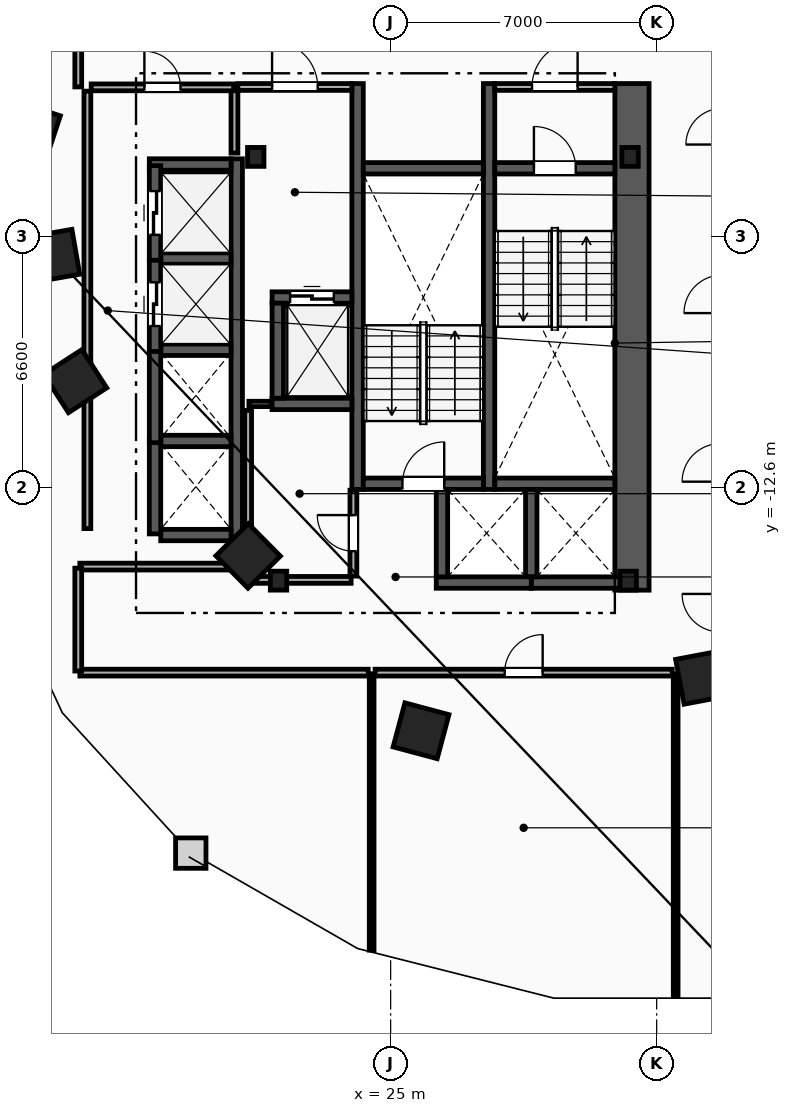
"""IFC4 building model, lengths in metres.
Left out: names, types, materials, properties, quantities, classifications, styles, units other than length and angle.
Written with IfcOpenShell. Run it as: python <this file> out.ifc"""

import sys

from ifc_helpers import new_model, si_unit, direction, frame, frame_2d, origin, origin_2d, place, context, subcontext, project, spatial, rectangle, i_section, extrude, element, fill, save


model = new_model("IFC4")
c1 = context("Model", 3, precision=1e-05, world=origin(), true_north=direction((0.0, 1.0)))
c2 = subcontext(c1, "Body", "Model", "MODEL_VIEW")
j1 = project(units=[si_unit("LENGTHUNIT", "METRE"), si_unit("PLANEANGLEUNIT", "RADIAN")], contexts=[c1])
p1 = place(None, origin())
s1 = spatial("IfcSite", under=j1, at=p1, CompositionType="ELEMENT")
p2 = place(p1, origin())
s2 = spatial("IfcBuilding", under=s1, at=p2, CompositionType="ELEMENT")
p3 = place(p2, frame((0.0, 0.0, 58.2)))
s3 = spatial("IfcBuildingStorey", under=s2, at=p3, CompositionType="ELEMENT", Elevation=58.2)
for number, where, z_axis, x_axis in (
    (1, (31.3, -3.9, 0.0), (0.0, 0.0, 1.0), (1.0, 0.0, 0.0)),
    (2, (21.45, -3.9, 0.0), (0.0, 0.0, 1.0), (1.0, 0.0, 0.0)),
    (3, (22.05, -15.05, 0.0), (0.0, 0.0, 1.0), (1.0, 0.0, 0.0)),
    (4, (31.25, -15.05, 0.0), (0.0, 0.0, 1.0), (1.0, 0.0, 0.0)),
):
    element("IfcColumn", number, at=place(p3, frame(where, z_axis=z_axis, x_axis=x_axis)), inside=s3, PredefinedType="COLUMN", context=c2, shape_type="SweptSolid", body=[
        extrude(i_section(OverallWidth=0.432, OverallDepth=0.498, WebThickness=0.056, FlangeThickness=0.089, FilletRadius=0.018, at=origin_2d()), origin(), (0.0, 0.0, 1.0), 3.8),
    ])
for number, where, z_axis, x_axis in (
    (5, (15.55, -3.2, 0.0), (0.0, 0.0, 1.0), (-0.315, -0.949, 0.0)),
    (6, (16.125, -6.5, 0.0), (0.0, 0.0, 1.0), (0.172, -0.985, 0.0)),
    (7, (16.7, -9.8, 0.0), (0.0, 0.0, 1.0), (0.544, -0.839, 0.0)),
    (8, (21.25, -14.4, 0.0), (0.0, 0.0, 1.0), (0.703, -0.711, 0.0)),
    (9, (25.8, -19.0, 0.0), (0.0, 0.0, 1.0), (0.966, -0.259, 0.0)),
    (10, (33.2, -17.6, 0.0), (0.0, 0.0, 1.0), (0.983, 0.186, 0.0)),
):
    element("IfcColumn", number, at=place(p3, frame(where, z_axis=z_axis, x_axis=x_axis)), inside=s3, PredefinedType="COLUMN", context=c2, shape_type="SweptSolid", body=[
        extrude(rectangle(XDim=1.2, YDim=1.2, at=origin_2d()), origin(), (0.0, 0.0, 1.0), 3.8),
    ])
p4 = place(p3, frame((31.35, -15.3, 0.0), z_axis=(0.0, 0.0, 1.0), x_axis=(0.0, 1.0, 0.0)))
e11 = element("IfcWall", 11, at=p4, inside=s3, PredefinedType="SHEAR", context=c2, shape_type="SweptSolid", body=[
    extrude(rectangle(XDim=13.33, YDim=0.9, at=frame_2d((6.665, 0.0))), origin(), (0.0, 0.0, 1.0), 3.5),
])
for number, where, z_axis, x_axis in (
    (12, (27.59, -12.65, 0.0), (0.0, 0.0, 1.0), (0.0, 1.0, 0.0)),
    (13, (24.13, -12.65, 0.0), (0.0, 0.0, 1.0), (0.0, 1.0, 0.0)),
):
    element("IfcWall", number, at=place(p3, frame(where, z_axis=z_axis, x_axis=x_axis)), inside=s3, PredefinedType="SHEAR", context=c2, shape_type="SweptSolid", body=[
        extrude(rectangle(XDim=10.68, YDim=0.3, at=frame_2d((5.34, 0.0))), origin(), (0.0, 0.0, 1.0), 3.5),
    ])
p5 = place(p3, frame((27.74, -4.2, 0.0), z_axis=(0.0, 0.0, 1.0), x_axis=(1.0, 0.0, 0.0)))
e14 = element("IfcWall", 14, at=p5, inside=s3, PredefinedType="SHEAR", context=c2, shape_type="SweptSolid", body=[
    extrude(rectangle(XDim=3.16, YDim=0.3, at=frame_2d((1.58, 0.0))), origin(), (0.0, 0.0, 1.0), 3.5),
])
p6 = place(p5, frame((1.03, 0.0, 0.0)))
e15 = element("IfcOpeningElement", 15, at=p6, cuts=e14, PredefinedType="OPENING", context=c2, shape_type="SweptSolid", body=[
    extrude(rectangle(XDim=1.1, YDim=2.15, at=frame_2d((0.55, 1.075))), frame((0.0, 0.16, 0.0), z_axis=(0.0, -1.0, 0.0), x_axis=(1.0, 0.0, 0.0)), (0.0, 0.0, 1.0), 0.32),
])
p7 = place(p3, frame((27.74, -12.5, 0.0), z_axis=(0.0, 0.0, 1.0), x_axis=(1.0, 0.0, 0.0)))
e16 = element("IfcWall", 16, at=p7, inside=s3, PredefinedType="SHEAR", context=c2, shape_type="SweptSolid", body=[
    extrude(rectangle(XDim=3.16, YDim=0.3, at=frame_2d((1.58, 0.0))), origin(), (0.0, 0.0, 1.0), 3.5),
])
p8 = place(p3, frame((24.28, -12.5, 0.0), z_axis=(0.0, 0.0, 1.0), x_axis=(1.0, 0.0, 0.0)))
e17 = element("IfcWall", 17, at=p8, inside=s3, PredefinedType="SHEAR", context=c2, shape_type="SweptSolid", body=[
    extrude(rectangle(XDim=3.16, YDim=0.3, at=frame_2d((1.58, 0.0))), origin(), (0.0, 0.0, 1.0), 3.5),
])
p9 = place(p8, frame((1.03, 0.0, 0.0)))
e18 = element("IfcOpeningElement", 18, at=p9, cuts=e17, PredefinedType="OPENING", context=c2, shape_type="SweptSolid", body=[
    extrude(rectangle(XDim=1.1, YDim=2.15, at=frame_2d((0.55, 1.075))), frame((0.0, 0.16, 0.0), z_axis=(0.0, -1.0, 0.0), x_axis=(1.0, 0.0, 0.0)), (0.0, 0.0, 1.0), 0.32),
])
p10 = place(p3, frame((24.28, -4.2, 0.0), z_axis=(0.0, 0.0, 1.0), x_axis=(1.0, 0.0, 0.0)))
e19 = element("IfcWall", 19, at=p10, inside=s3, PredefinedType="SHEAR", context=c2, shape_type="SweptSolid", body=[
    extrude(rectangle(XDim=3.16, YDim=0.3, at=frame_2d((1.58, 0.0))), origin(), (0.0, 0.0, 1.0), 3.5),
])
p11 = place(p3, frame((20.89, -3.8, 0.0), z_axis=(0.0, 0.0, 1.0), x_axis=(0.0, 1.0, 0.0)))
e20 = element("IfcWall", 20, at=p11, inside=s3, PredefinedType="PARTITIONING", context=c2, shape_type="SweptSolid", body=[
    extrude(rectangle(XDim=1.65, YDim=0.18, at=frame_2d((0.825, 0.0))), origin(), (0.0, 0.0, 1.0), 3.5),
])
p12 = place(p3, frame((20.98, -2.06, 0.0), z_axis=(0.0, 0.0, 1.0), x_axis=(1.0, 0.0, 0.0)))
e21 = element("IfcWall", 21, at=p12, inside=s3, PredefinedType="PARTITIONING", context=c2, shape_type="SweptSolid", body=[
    extrude(rectangle(XDim=3.0, YDim=0.18, at=frame_2d((1.5, 0.0))), origin(), (0.0, 0.0, 1.0), 3.5),
])
p13 = place(p12, frame((0.9, 0.0, 0.0)))
e22 = element("IfcOpeningElement", 22, at=p13, cuts=e21, PredefinedType="OPENING", context=c2, shape_type="SweptSolid", body=[
    extrude(rectangle(XDim=1.2, YDim=2.15, at=frame_2d((0.6, 1.075))), frame((0.0, 0.1, 0.0), z_axis=(0.0, -1.0, 0.0), x_axis=(1.0, 0.0, 0.0)), (0.0, 0.0, 1.0), 0.2),
])
p14 = place(p3, frame((27.74, -2.06, 0.0), z_axis=(0.0, 0.0, 1.0), x_axis=(1.0, 0.0, 0.0)))
e23 = element("IfcWall", 23, at=p14, inside=s3, PredefinedType="PARTITIONING", context=c2, shape_type="SweptSolid", body=[
    extrude(rectangle(XDim=3.16, YDim=0.18, at=frame_2d((1.58, 0.0))), origin(), (0.0, 0.0, 1.0), 3.5),
])
p15 = place(p14, frame((0.98, 0.0, 0.0)))
e24 = element("IfcOpeningElement", 24, at=p15, cuts=e23, PredefinedType="OPENING", context=c2, shape_type="SweptSolid", body=[
    extrude(rectangle(XDim=1.2, YDim=2.15, at=frame_2d((0.6, 1.075))), frame((0.0, 0.1, 0.0), z_axis=(0.0, -1.0, 0.0), x_axis=(1.0, 0.0, 0.0)), (0.0, 0.0, 1.0), 0.2),
])
p16 = place(p3, frame((21.88, -7.6, 0.0), z_axis=(0.0, 0.0, 1.0), x_axis=(1.0, 0.0, 0.0)))
e25 = element("IfcWall", 25, at=p16, inside=s3, PredefinedType="SHEAR", context=c2, shape_type="SweptSolid", body=[
    extrude(rectangle(XDim=2.1, YDim=0.3, at=frame_2d((1.05, 0.0))), origin(), (0.0, 0.0, 1.0), 3.5),
])
p17 = place(p16, frame((0.475, 0.0, 0.0)))
e26 = element("IfcOpeningElement", 26, at=p17, cuts=e25, PredefinedType="OPENING", context=c2, shape_type="SweptSolid", body=[
    extrude(rectangle(XDim=1.15, YDim=2.2, at=frame_2d((0.575, 1.1))), frame((0.0, 0.16, 0.0), z_axis=(0.0, -1.0, 0.0), x_axis=(1.0, 0.0, 0.0)), (0.0, 0.0, 1.0), 0.32),
])
p18 = place(p3, frame((21.88, -10.4, 0.0), z_axis=(0.0, 0.0, 1.0), x_axis=(1.0, 0.0, 0.0)))
e27 = element("IfcWall", 27, at=p18, inside=s3, PredefinedType="SHEAR", context=c2, shape_type="SweptSolid", body=[
    extrude(rectangle(XDim=2.1, YDim=0.3, at=frame_2d((1.05, 0.0))), origin(), (0.0, 0.0, 1.0), 3.5),
])
for number, where, z_axis, x_axis in (
    (28, (22.03, -10.25, 0.0), (0.0, 0.0, 1.0), (0.0, 1.0, 0.0)),
    (29, (28.7, -15.1, 0.0), (0.0, 0.0, 1.0), (1.0, 0.0, 0.0)),
):
    element("IfcWall", number, at=place(p3, frame(where, z_axis=z_axis, x_axis=x_axis)), inside=s3, PredefinedType="SHEAR", context=c2, shape_type="SweptSolid", body=[
        extrude(rectangle(XDim=2.5, YDim=0.3, at=frame_2d((1.25, 0.0))), origin(), (0.0, 0.0, 1.0), 3.5),
    ])
p19 = place(p3, frame((28.7, -14.95, 0.0), z_axis=(0.0, 0.0, 1.0), x_axis=(0.0, 1.0, 0.0)))
e30 = element("IfcWall", 30, at=p19, inside=s3, PredefinedType="SHEAR", context=c2, shape_type="SweptSolid", body=[
    extrude(rectangle(XDim=2.3, YDim=0.3, at=frame_2d((1.15, 0.0))), origin(), (0.0, 0.0, 1.0), 3.5),
])
p20 = place(p3, frame((26.2, -15.1, 0.0), z_axis=(0.0, 0.0, 1.0), x_axis=(1.0, 0.0, 0.0)))
e31 = element("IfcWall", 31, at=p20, inside=s3, PredefinedType="SHEAR", context=c2, shape_type="SweptSolid", body=[
    extrude(rectangle(XDim=2.5, YDim=0.3, at=frame_2d((1.25, 0.0))), origin(), (0.0, 0.0, 1.0), 3.5),
])
p21 = place(p3, frame((26.35, -14.95, 0.0), z_axis=(0.0, 0.0, 1.0), x_axis=(0.0, 1.0, 0.0)))
e32 = element("IfcWall", 32, at=p21, inside=s3, PredefinedType="SHEAR", context=c2, shape_type="SweptSolid", body=[
    extrude(rectangle(XDim=2.3, YDim=0.3, at=frame_2d((1.15, 0.0))), origin(), (0.0, 0.0, 1.0), 3.5),
])
p22 = place(p3, frame((20.95, -14.0, 0.0), z_axis=(0.0, 0.0, 1.0), x_axis=(0.0, 1.0, 0.0)))
e33 = element("IfcWall", 33, at=p22, inside=s3, PredefinedType="SHEAR", context=c2, shape_type="SweptSolid", body=[
    extrude(rectangle(XDim=10.05, YDim=0.3, at=frame_2d((5.025, 0.0))), origin(), (0.0, 0.0, 1.0), 3.5),
])
p23 = place(p3, frame((18.95, -13.85, 0.0), z_axis=(0.0, 0.0, 1.0), x_axis=(1.0, 0.0, 0.0)))
e34 = element("IfcWall", 34, at=p23, inside=s3, PredefinedType="SHEAR", context=c2, shape_type="SweptSolid", body=[
    extrude(rectangle(XDim=1.85, YDim=0.3, at=frame_2d((0.925, 0.0))), origin(), (0.0, 0.0, 1.0), 3.5),
])
p24 = place(p3, frame((18.65, -4.1, 0.0), z_axis=(0.0, 0.0, 1.0), x_axis=(1.0, 0.0, 0.0)))
e35 = element("IfcWall", 35, at=p24, inside=s3, PredefinedType="SHEAR", context=c2, shape_type="SweptSolid", body=[
    extrude(rectangle(XDim=2.15, YDim=0.3, at=frame_2d((1.075, 0.0))), origin(), (0.0, 0.0, 1.0), 3.5),
])
for number, where, z_axis, x_axis in (
    (36, (18.95, -11.375, 0.0), (0.0, 0.0, 1.0), (1.0, 0.0, 0.0)),
    (37, (18.95, -8.975, 0.0), (0.0, 0.0, 1.0), (1.0, 0.0, 0.0)),
    (38, (18.95, -6.575, 0.0), (0.0, 0.0, 1.0), (1.0, 0.0, 0.0)),
):
    element("IfcWall", number, at=place(p3, frame(where, z_axis=z_axis, x_axis=x_axis)), inside=s3, PredefinedType="SHEAR", context=c2, shape_type="SweptSolid", body=[
        extrude(rectangle(XDim=1.85, YDim=0.3, at=frame_2d((0.925, 0.0))), origin(), (0.0, 0.0, 1.0), 3.5),
    ])
for number, where, z_axis, x_axis in (
    (39, (18.8, -13.82, 0.0), (0.0, 0.0, 1.0), (0.0, 1.0, 0.0)),
    (40, (18.8, -11.42, 0.0), (0.0, 0.0, 1.0), (0.0, 1.0, 0.0)),
):
    element("IfcWall", number, at=place(p3, frame(where, z_axis=z_axis, x_axis=x_axis)), inside=s3, PredefinedType="SHEAR", context=c2, shape_type="SweptSolid", body=[
        extrude(rectangle(XDim=2.49, YDim=0.3, at=frame_2d((1.245, 0.0))), origin(), (0.0, 0.0, 1.0), 3.5),
    ])
p25 = place(p3, frame((18.8, -9.02, 0.0), z_axis=(0.0, 0.0, 1.0), x_axis=(0.0, 1.0, 0.0)))
e41 = element("IfcWall", 41, at=p25, inside=s3, PredefinedType="SHEAR", context=c2, shape_type="SweptSolid", body=[
    extrude(rectangle(XDim=2.49, YDim=0.3, at=frame_2d((1.245, 0.0))), origin(), (0.0, 0.0, 1.0), 3.5),
])
p26 = place(p25, frame((0.67, 0.0, 0.0)))
e42 = element("IfcOpeningElement", 42, at=p26, cuts=e41, PredefinedType="OPENING", context=c2, shape_type="SweptSolid", body=[
    extrude(rectangle(XDim=1.15, YDim=2.2, at=frame_2d((0.575, 1.1))), frame((0.0, 0.16, 0.0), z_axis=(0.0, -1.0, 0.0), x_axis=(1.0, 0.0, 0.0)), (0.0, 0.0, 1.0), 0.32),
])
p27 = place(p3, frame((18.8, -6.62, 0.0), z_axis=(0.0, 0.0, 1.0), x_axis=(0.0, 1.0, 0.0)))
e43 = element("IfcWall", 43, at=p27, inside=s3, PredefinedType="SHEAR", context=c2, shape_type="SweptSolid", body=[
    extrude(rectangle(XDim=2.49, YDim=0.3, at=frame_2d((1.245, 0.0))), origin(), (0.0, 0.0, 1.0), 3.5),
])
p28 = place(p27, frame((0.67, 0.0, 0.0)))
e44 = element("IfcOpeningElement", 44, at=p28, cuts=e43, PredefinedType="OPENING", context=c2, shape_type="SweptSolid", body=[
    extrude(rectangle(XDim=1.15, YDim=2.2, at=frame_2d((0.575, 1.1))), frame((0.0, 0.16, 0.0), z_axis=(0.0, -1.0, 0.0), x_axis=(1.0, 0.0, 0.0)), (0.0, 0.0, 1.0), 0.32),
])
p29 = place(p3, frame((17.02, -13.68, 0.0), z_axis=(0.0, 0.0, 1.0), x_axis=(0.0, 1.0, 0.0)))
e45 = element("IfcWall", 45, at=p29, inside=s3, PredefinedType="PARTITIONING", context=c2, shape_type="SweptSolid", body=[
    extrude(rectangle(XDim=11.51, YDim=0.18, at=frame_2d((5.755, 0.0))), origin(), (0.0, 0.0, 1.0), 3.5),
])
p30 = place(p3, frame((17.12, -2.07, 0.0), z_axis=(0.0, 0.0, 1.0), x_axis=(1.0, 0.0, 0.0)))
e46 = element("IfcWall", 46, at=p30, inside=s3, PredefinedType="PARTITIONING", context=c2, shape_type="SweptSolid", body=[
    extrude(rectangle(XDim=3.75, YDim=0.18, at=frame_2d((1.875, 0.0))), origin(), (0.0, 0.0, 1.0), 3.5),
])
p31 = place(p30, frame((1.4, 0.0, 0.0)))
e47 = element("IfcOpeningElement", 47, at=p31, cuts=e46, PredefinedType="OPENING", context=c2, shape_type="SweptSolid", body=[
    extrude(rectangle(XDim=0.95, YDim=2.1, at=frame_2d((0.475, 1.05))), frame((0.0, 0.1, 0.0), z_axis=(0.0, -1.0, 0.0), x_axis=(1.0, 0.0, 0.0)), (0.0, 0.0, 1.0), 0.2),
])
p32 = place(p3, frame((21.27, -10.4, 0.0), z_axis=(0.0, 0.0, 1.0), x_axis=(1.0, 0.0, 0.0)))
e48 = element("IfcWall", 48, at=p32, inside=s3, PredefinedType="PARTITIONING", context=c2, shape_type="SweptSolid", body=[
    extrude(rectangle(XDim=0.59, YDim=0.14, at=frame_2d((0.295, 0.0))), origin(), (0.0, 0.0, 1.0), 3.5),
])
p33 = place(p3, frame((21.25, -14.93, 0.0), z_axis=(0.0, 0.0, 1.0), x_axis=(0.0, 1.0, 0.0)))
e49 = element("IfcWall", 49, at=p33, inside=s3, PredefinedType="PARTITIONING", context=c2, shape_type="SweptSolid", body=[
    extrude(rectangle(XDim=4.36, YDim=0.18, at=frame_2d((2.18, 0.0))), origin(), (0.0, 0.0, 1.0), 3.5),
])
p34 = place(p3, frame((21.35, -15.03, 0.0), z_axis=(0.0, 0.0, 1.0), x_axis=(1.0, 0.0, 0.0)))
e50 = element("IfcWall", 50, at=p34, inside=s3, PredefinedType="PARTITIONING", context=c2, shape_type="SweptSolid", body=[
    extrude(rectangle(XDim=2.61, YDim=0.18, at=frame_2d((1.305, 0.0))), origin(), (0.0, 0.0, 1.0), 2.573),
])
p35 = place(p3, frame((24.02, -14.93, 0.0), z_axis=(0.0, 0.0, 1.0), x_axis=(0.0, 1.0, 0.0)))
e51 = element("IfcWall", 51, at=p35, inside=s3, PredefinedType="PARTITIONING", context=c2, shape_type="SweptSolid", body=[
    extrude(rectangle(XDim=2.26, YDim=0.18, at=frame_2d((1.13, 0.0))), origin(), (0.0, 0.0, 1.0), 3.5),
])
p36 = place(p35, frame((0.655, 0.0, 0.0)))
e52 = element("IfcOpeningElement", 52, at=p36, cuts=e51, PredefinedType="OPENING", context=c2, shape_type="SweptSolid", body=[
    extrude(rectangle(XDim=0.95, YDim=2.1, at=frame_2d((0.475, 1.05))), frame((0.0, 0.1, 0.0), z_axis=(0.0, -1.0, 0.0), x_axis=(1.0, 0.0, 0.0)), (0.0, 0.0, 1.0), 0.2),
])
p37 = place(p3, frame((24.5, -24.772, 0.0), z_axis=(0.0, 0.0, 1.0), x_axis=(0.0, 1.0, 0.0)))
e53 = element("IfcWall", 53, at=p37, inside=s3, PredefinedType="PARTITIONING", context=c2, shape_type="SweptSolid", body=[
    extrude(rectangle(XDim=7.272, YDim=0.125, at=frame_2d((3.636, 0.0))), origin(), (0.0, 0.0, 1.0), 3.5),
])
p38 = place(p3, frame((32.5, -25.985, 0.0), z_axis=(0.0, 0.0, 1.0), x_axis=(0.0, 1.0, 0.0)))
e54 = element("IfcWall", 54, at=p38, inside=s3, PredefinedType="PARTITIONING", context=c2, shape_type="SweptSolid", body=[
    extrude(rectangle(XDim=8.485, YDim=0.125, at=frame_2d((4.243, 0.0))), origin(), (0.0, 0.0, 1.0), 3.5),
])
p39 = place(p3, frame((24.59, -17.47, 0.0), z_axis=(0.0, 0.0, 1.0), x_axis=(1.0, 0.0, 0.0)))
e55 = element("IfcWall", 55, at=p39, inside=s3, PredefinedType="PARTITIONING", context=c2, shape_type="SweptSolid", body=[
    extrude(rectangle(XDim=7.82, YDim=0.18, at=frame_2d((3.91, 0.0))), origin(), (0.0, 0.0, 1.0), 3.5),
])
p40 = place(p39, frame((3.41, 0.0, 0.0)))
e56 = element("IfcOpeningElement", 56, at=p40, cuts=e55, PredefinedType="OPENING", context=c2, shape_type="SweptSolid", body=[
    extrude(rectangle(XDim=1.0, YDim=2.15, at=frame_2d((0.5, 1.075))), frame((0.0, 0.1, 0.0), z_axis=(0.0, -1.0, 0.0), x_axis=(1.0, 0.0, 0.0)), (0.0, 0.0, 1.0), 0.2),
])
p41 = place(p3, frame((32.59, -17.47, 0.0), z_axis=(0.0, 0.0, 1.0), x_axis=(1.0, 0.0, 0.0)))
e57 = element("IfcWall", 57, at=p41, inside=s3, PredefinedType="PARTITIONING", context=c2, shape_type="SweptSolid", body=[
    extrude(rectangle(XDim=1.038, YDim=0.18, at=frame_2d((0.519, 0.0))), origin(), (0.0, 0.0, 1.0), 3.5),
])
p42 = place(p3, frame((16.822, -17.47, 0.0), z_axis=(0.0, 0.0, 1.0), x_axis=(1.0, 0.0, 0.0)))
e58 = element("IfcWall", 58, at=p42, inside=s3, PredefinedType="PARTITIONING", context=c2, shape_type="SweptSolid", body=[
    extrude(rectangle(XDim=7.588, YDim=0.18, at=frame_2d((3.794, 0.0))), origin(), (0.0, 0.0, 1.0), 3.5),
])
p43 = place(p3, frame((21.178, -14.68, 0.0), z_axis=(0.0, 0.0, 1.0), x_axis=(-1.0, 0.0, 0.0)))
e59 = element("IfcWall", 59, at=p43, inside=s3, PredefinedType="PARTITIONING", context=c2, shape_type="SweptSolid", body=[
    extrude(rectangle(XDim=4.357, YDim=0.18, at=frame_2d((2.178, 0.0))), origin(), (0.0, 0.0, 1.0), 3.5),
])
p44 = place(p3, frame((16.78, -14.721, 0.0), z_axis=(0.0, 0.0, 1.0), x_axis=(0.0, -1.0, 0.0)))
e60 = element("IfcWall", 60, at=p44, inside=s3, PredefinedType="PARTITIONING", context=c2, shape_type="SweptSolid", body=[
    extrude(rectangle(XDim=2.707, YDim=0.18, at=frame_2d((1.354, 0.0))), origin(), (0.0, 0.0, 1.0), 3.5),
])
p45 = place(p3, frame((16.78, 0.329, 0.0), z_axis=(0.0, 0.0, 1.0), x_axis=(0.0, -1.0, 0.0)))
e61 = element("IfcWall", 61, at=p45, inside=s3, PredefinedType="PARTITIONING", context=c2, shape_type="SweptSolid", body=[
    extrude(rectangle(XDim=2.387, YDim=0.18, at=frame_2d((1.194, 0.0))), origin(), (0.0, 0.0, 1.0), 3.5),
])
p46 = place(p6, origin())
e62 = element("IfcDoor", 62, at=p46, inside=s3, OperationType="SINGLE_SWING_LEFT", PredefinedType="DOOR", context=c2, shape_type="SweptSolid", body=[
    extrude(rectangle(XDim=1.1, YDim=2.15, at=frame_2d((0.55, 1.075))), frame((0.0, 0.025, 0.0), z_axis=(0.0, -1.0, 0.0), x_axis=(1.0, 0.0, 0.0)), (0.0, 0.0, 1.0), 0.05),
])
fill(e15, e62)
p47 = place(p9, origin())
e63 = element("IfcDoor", 63, at=p47, inside=s3, OperationType="SINGLE_SWING_RIGHT", PredefinedType="DOOR", context=c2, shape_type="SweptSolid", body=[
    extrude(rectangle(XDim=1.1, YDim=2.15, at=frame_2d((0.55, 1.075))), frame((0.0, 0.025, 0.0), z_axis=(0.0, -1.0, 0.0), x_axis=(1.0, 0.0, 0.0)), (0.0, 0.0, 1.0), 0.05),
])
fill(e18, e63)
p48 = place(p13, origin())
e64 = element("IfcDoor", 64, at=p48, inside=s3, OperationType="SINGLE_SWING_LEFT", PredefinedType="DOOR", context=c2, shape_type="SweptSolid", body=[
    extrude(rectangle(XDim=1.2, YDim=2.15, at=frame_2d((0.6, 1.075))), frame((0.0, 0.025, 0.0), z_axis=(0.0, -1.0, 0.0), x_axis=(1.0, 0.0, 0.0)), (0.0, 0.0, 1.0), 0.05),
])
fill(e22, e64)
p49 = place(p15, origin())
e65 = element("IfcDoor", 65, at=p49, inside=s3, OperationType="SINGLE_SWING_RIGHT", PredefinedType="DOOR", context=c2, shape_type="SweptSolid", body=[
    extrude(rectangle(XDim=1.2, YDim=2.15, at=frame_2d((0.6, 1.075))), frame((0.0, 0.025, 0.0), z_axis=(0.0, -1.0, 0.0), x_axis=(1.0, 0.0, 0.0)), (0.0, 0.0, 1.0), 0.05),
])
fill(e24, e65)
p50 = place(p17, origin())
e66 = element("IfcDoor", 66, at=p50, inside=s3, OperationType="SLIDING_TO_LEFT", PredefinedType="TRAPDOOR", context=c2, shape_type="SweptSolid", body=[
    extrude(rectangle(XDim=1.15, YDim=2.2, at=frame_2d((0.575, 1.1))), frame((0.0, 0.025, 0.0), z_axis=(0.0, -1.0, 0.0), x_axis=(1.0, 0.0, 0.0)), (0.0, 0.0, 1.0), 0.05),
])
fill(e26, e66)
p51 = place(p26, origin())
e67 = element("IfcDoor", 67, at=p51, inside=s3, OperationType="SLIDING_TO_LEFT", PredefinedType="TRAPDOOR", context=c2, shape_type="SweptSolid", body=[
    extrude(rectangle(XDim=1.15, YDim=2.2, at=frame_2d((0.575, 1.1))), frame((0.0, 0.025, 0.0), z_axis=(0.0, -1.0, 0.0), x_axis=(1.0, 0.0, 0.0)), (0.0, 0.0, 1.0), 0.05),
])
fill(e42, e67)
p52 = place(p28, origin())
e68 = element("IfcDoor", 68, at=p52, inside=s3, OperationType="SLIDING_TO_LEFT", PredefinedType="TRAPDOOR", context=c2, shape_type="SweptSolid", body=[
    extrude(rectangle(XDim=1.15, YDim=2.2, at=frame_2d((0.575, 1.1))), frame((0.0, 0.025, 0.0), z_axis=(0.0, -1.0, 0.0), x_axis=(1.0, 0.0, 0.0)), (0.0, 0.0, 1.0), 0.05),
])
fill(e44, e68)
p53 = place(p40, origin())
e69 = element("IfcDoor", 69, at=p53, inside=s3, OperationType="SINGLE_SWING_RIGHT", PredefinedType="DOOR", context=c2, shape_type="SweptSolid", body=[
    extrude(rectangle(XDim=1.0, YDim=2.15, at=frame_2d((0.5, 1.075))), frame((0.0, 0.025, 0.0), z_axis=(0.0, -1.0, 0.0), x_axis=(1.0, 0.0, 0.0)), (0.0, 0.0, 1.0), 0.05),
])
fill(e56, e69)
p54 = place(p31, origin())
e70 = element("IfcDoor", 70, at=p54, inside=s3, OperationType="SINGLE_SWING_LEFT", PredefinedType="DOOR", context=c2, shape_type="SweptSolid", body=[
    extrude(rectangle(XDim=0.95, YDim=2.1, at=frame_2d((0.475, 1.05))), frame((0.0, 0.025, 0.0), z_axis=(0.0, -1.0, 0.0), x_axis=(1.0, 0.0, 0.0)), (0.0, 0.0, 1.0), 0.05),
])
fill(e47, e70)
p55 = place(p36, origin())
e71 = element("IfcDoor", 71, at=p55, inside=s3, OperationType="SINGLE_SWING_RIGHT", PredefinedType="DOOR", context=c2, shape_type="SweptSolid", body=[
    extrude(rectangle(XDim=0.95, YDim=2.1, at=frame_2d((0.475, 1.05))), frame((0.0, 0.025, 0.0), z_axis=(0.0, -1.0, 0.0), x_axis=(1.0, 0.0, 0.0)), (0.0, 0.0, 1.0), 0.05),
])
fill(e52, e71)
save(model, sys.argv[1])
